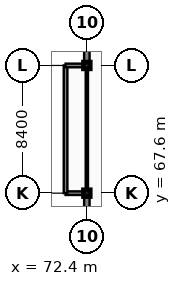
"""IFC4 building model, lengths in metres.
Left out: names, types, materials, properties, quantities, classifications, styles, units other than length and angle.
Written with IfcOpenShell. Run it as: python <this file> out.ifc"""

import sys

from ifc_helpers import new_model, si_unit, direction, frame, frame_2d, origin, origin_2d, place, context, subcontext, project, spatial, rectangle, extrude, element, fill, save


model = new_model("IFC4")
c1 = context("Model", 3, precision=1e-05, world=origin(), true_north=direction((0.0, 1.0)))
c2 = subcontext(c1, "Body", "Model", "MODEL_VIEW")
j1 = project(units=[si_unit("LENGTHUNIT", "METRE"), si_unit("PLANEANGLEUNIT", "RADIAN")], contexts=[c1])
p1 = place(None, origin())
s1 = spatial("IfcSite", under=j1, at=p1, CompositionType="ELEMENT")
p2 = place(p1, origin())
s2 = spatial("IfcBuilding", under=s1, at=p2, CompositionType="ELEMENT")
p3 = place(p2, frame((0.0, 0.0, 5.4)))
s3 = spatial("IfcBuildingStorey", under=s2, at=p3, CompositionType="ELEMENT", Elevation=5.4)
for number, where, z_axis, x_axis in (
    (1, (72.4, 67.6, 0.0), (0.0, 0.0, 1.0), (1.0, 0.0, 0.0)),
    (2, (72.4, 76.0, 0.0), (0.0, 0.0, 1.0), (1.0, 0.0, 0.0)),
):
    element("IfcColumn", number, at=place(p3, frame(where, z_axis=z_axis, x_axis=x_axis)), inside=s3, PredefinedType="COLUMN", context=c2, shape_type="SweptSolid", body=[
        extrude(rectangle(XDim=0.44, YDim=0.44, at=origin_2d()), origin(), (0.0, 0.0, 1.0), 4.2),
    ])
p4 = place(p3, frame((72.4, 67.6, 0.0), z_axis=(0.0, 0.0, 1.0), x_axis=(0.0, 1.0, 0.0)))
e3 = element("IfcWall", 3, at=p4, inside=s3, PredefinedType="PARTITIONING", context=c2, shape_type="SweptSolid", body=[
    extrude(rectangle(XDim=8.4, YDim=0.15, at=frame_2d((4.2, 0.0))), origin(), (0.0, 0.0, 1.0), 3.25),
])
p5 = place(p4, frame((3.7, 0.0, -0.01)))
e4 = element("IfcOpeningElement", 4, at=p5, cuts=e3, PredefinedType="OPENING", context=c2, shape_type="SweptSolid", body=[
    extrude(rectangle(XDim=1.0, YDim=2.16, at=frame_2d((0.5, 1.08))), frame((0.0, 0.085, 0.0), z_axis=(0.0, -1.0, 0.0), x_axis=(1.0, 0.0, 0.0)), (0.0, 0.0, 1.0), 0.17),
])
p6 = place(p3, frame((72.4, 67.6, 0.0), z_axis=(0.0, 0.0, 1.0), x_axis=(0.0, -1.0, 0.0)))
e5 = element("IfcWall", 5, at=p6, inside=s3, PredefinedType="SOLIDWALL", context=c2, shape_type="SweptSolid", body=[
    extrude(rectangle(XDim=8.4, YDim=0.36, at=frame_2d((4.2, 0.0))), origin(), (0.0, 0.0, 1.0), 3.25),
])
p7 = place(p6, frame((0.46, 0.0, 0.75)))
e6 = element("IfcOpeningElement", 6, at=p7, cuts=e5, PredefinedType="OPENING", context=c2, shape_type="SweptSolid", body=[
    extrude(rectangle(XDim=1.55, YDim=2.36, at=frame_2d((0.775, 1.18))), frame((0.0, 0.19, 0.0), z_axis=(0.0, -1.0, 0.0), x_axis=(1.0, 0.0, 0.0)), (0.0, 0.0, 1.0), 0.38),
])
p8 = place(p6, frame((6.26, 0.0, 0.75)))
e7 = element("IfcOpeningElement", 7, at=p8, cuts=e5, PredefinedType="OPENING", context=c2, shape_type="SweptSolid", body=[
    extrude(rectangle(XDim=1.55, YDim=2.36, at=frame_2d((0.775, 1.18))), frame((0.0, 0.19, 0.0), z_axis=(0.0, -1.0, 0.0), x_axis=(1.0, 0.0, 0.0)), (0.0, 0.0, 1.0), 0.38),
])
p9 = place(p3, frame((72.4, 80.8, 0.0), z_axis=(0.0, 0.0, 1.0), x_axis=(0.0, -1.0, 0.0)))
e8 = element("IfcWall", 8, at=p9, inside=s3, PredefinedType="SOLIDWALL", context=c2, shape_type="SweptSolid", body=[
    extrude(rectangle(XDim=4.8, YDim=0.36, at=frame_2d((2.4, 0.0))), origin(), (0.0, 0.0, 1.0), 3.25),
])
p10 = place(p9, frame((0.46, 0.0, 0.75)))
e9 = element("IfcOpeningElement", 9, at=p10, cuts=e8, PredefinedType="OPENING", context=c2, shape_type="SweptSolid", body=[
    extrude(rectangle(XDim=1.55, YDim=2.36, at=frame_2d((0.775, 1.18))), frame((0.0, 0.19, 0.0), z_axis=(0.0, -1.0, 0.0), x_axis=(1.0, 0.0, 0.0)), (0.0, 0.0, 1.0), 0.38),
])
p11 = place(p9, frame((2.66, 0.0, 0.75)))
e10 = element("IfcOpeningElement", 10, at=p11, cuts=e8, PredefinedType="OPENING", context=c2, shape_type="SweptSolid", body=[
    extrude(rectangle(XDim=1.55, YDim=2.36, at=frame_2d((0.775, 1.18))), frame((0.0, 0.19, 0.0), z_axis=(0.0, -1.0, 0.0), x_axis=(1.0, 0.0, 0.0)), (0.0, 0.0, 1.0), 0.38),
])
p12 = place(p3, frame((72.25, 67.6, 0.0), z_axis=(0.0, 0.0, 1.0), x_axis=(-1.0, 0.0, 0.0)))
e11 = element("IfcWall", 11, at=p12, inside=s3, PredefinedType="SOLIDWALL", context=c2, shape_type="SweptSolid", body=[
    extrude(rectangle(XDim=1.25, YDim=0.24, at=frame_2d((0.625, 0.0))), origin(), (0.0, 0.0, 1.0), 3.25),
])
p13 = place(p3, frame((71.0, 67.6, 0.0), z_axis=(0.0, 0.0, 1.0), x_axis=(0.0, 1.0, 0.0)))
e12 = element("IfcWall", 12, at=p13, inside=s3, PredefinedType="SOLIDWALL", context=c2, shape_type="SweptSolid", body=[
    extrude(rectangle(XDim=8.4, YDim=0.24, at=frame_2d((4.2, 0.0))), origin(), (0.0, 0.0, 1.0), 3.25),
])
p14 = place(p13, frame((0.46, 0.0, 0.65)))
e13 = element("IfcOpeningElement", 13, at=p14, cuts=e12, PredefinedType="OPENING", context=c2, shape_type="SweptSolid", body=[
    extrude(rectangle(XDim=2.4, YDim=2.25, at=frame_2d((1.2, 1.125))), frame((0.0, 0.13, 0.0), z_axis=(0.0, -1.0, 0.0), x_axis=(1.0, 0.0, 0.0)), (0.0, 0.0, 1.0), 0.26),
])
p15 = place(p13, frame((5.46, 0.0, 0.65)))
e14 = element("IfcOpeningElement", 14, at=p15, cuts=e12, PredefinedType="OPENING", context=c2, shape_type="SweptSolid", body=[
    extrude(rectangle(XDim=2.4, YDim=2.25, at=frame_2d((1.2, 1.125))), frame((0.0, 0.13, 0.0), z_axis=(0.0, -1.0, 0.0), x_axis=(1.0, 0.0, 0.0)), (0.0, 0.0, 1.0), 0.26),
])
p16 = place(p3, frame((71.0, 76.0, 0.0), z_axis=(0.0, 0.0, 1.0), x_axis=(1.0, 0.0, 0.0)))
e15 = element("IfcWall", 15, at=p16, inside=s3, PredefinedType="SOLIDWALL", context=c2, shape_type="SweptSolid", body=[
    extrude(rectangle(XDim=1.25, YDim=0.24, at=frame_2d((0.625, 0.0))), origin(), (0.0, 0.0, 1.0), 3.25),
])
p17 = place(p5, frame((0.0, 0.0, 0.01)))
e16 = element("IfcDoor", 16, at=p17, inside=s3, OperationType="SINGLE_SWING_RIGHT", PredefinedType="DOOR", context=c2, shape_type="SweptSolid", body=[
    extrude(rectangle(XDim=1.0, YDim=2.15, at=frame_2d((0.5, 1.075))), frame((0.0, 0.025, 0.0), z_axis=(0.0, -1.0, 0.0), x_axis=(1.0, 0.0, 0.0)), (0.0, 0.0, 1.0), 0.05),
])
fill(e4, e16)
p18 = place(p7, origin())
e17 = element("IfcWindow", 17, at=p18, inside=s3, PartitioningType="DOUBLE_PANEL_HORIZONTAL", PredefinedType="WINDOW", context=c2, shape_type="SweptSolid", body=[
    extrude(rectangle(XDim=1.55, YDim=2.36, at=frame_2d((0.775, 1.18))), frame((0.0, 0.03, 0.0), z_axis=(0.0, -1.0, 0.0), x_axis=(1.0, 0.0, 0.0)), (0.0, 0.0, 1.0), 0.06),
])
fill(e6, e17)
p19 = place(p11, origin())
e18 = element("IfcWindow", 18, at=p19, inside=s3, PartitioningType="DOUBLE_PANEL_HORIZONTAL", PredefinedType="WINDOW", context=c2, shape_type="SweptSolid", body=[
    extrude(rectangle(XDim=1.55, YDim=2.36, at=frame_2d((0.775, 1.18))), frame((0.0, 0.03, 0.0), z_axis=(0.0, -1.0, 0.0), x_axis=(1.0, 0.0, 0.0)), (0.0, 0.0, 1.0), 0.06),
])
fill(e10, e18)
p20 = place(p14, origin())
e19 = element("IfcWindow", 19, at=p20, inside=s3, PartitioningType="TRIPLE_PANEL_VERTICAL", PredefinedType="WINDOW", context=c2, shape_type="SweptSolid", body=[
    extrude(rectangle(XDim=2.4, YDim=2.25, at=frame_2d((1.2, 1.125))), frame((0.0, 0.03, 0.0), z_axis=(0.0, -1.0, 0.0), x_axis=(1.0, 0.0, 0.0)), (0.0, 0.0, 1.0), 0.06),
])
fill(e13, e19)
p21 = place(p15, origin())
e20 = element("IfcWindow", 20, at=p21, inside=s3, PartitioningType="TRIPLE_PANEL_VERTICAL", PredefinedType="WINDOW", context=c2, shape_type="SweptSolid", body=[
    extrude(rectangle(XDim=2.4, YDim=2.25, at=frame_2d((1.2, 1.125))), frame((0.0, 0.03, 0.0), z_axis=(0.0, -1.0, 0.0), x_axis=(1.0, 0.0, 0.0)), (0.0, 0.0, 1.0), 0.06),
])
fill(e14, e20)
save(model, sys.argv[1])
